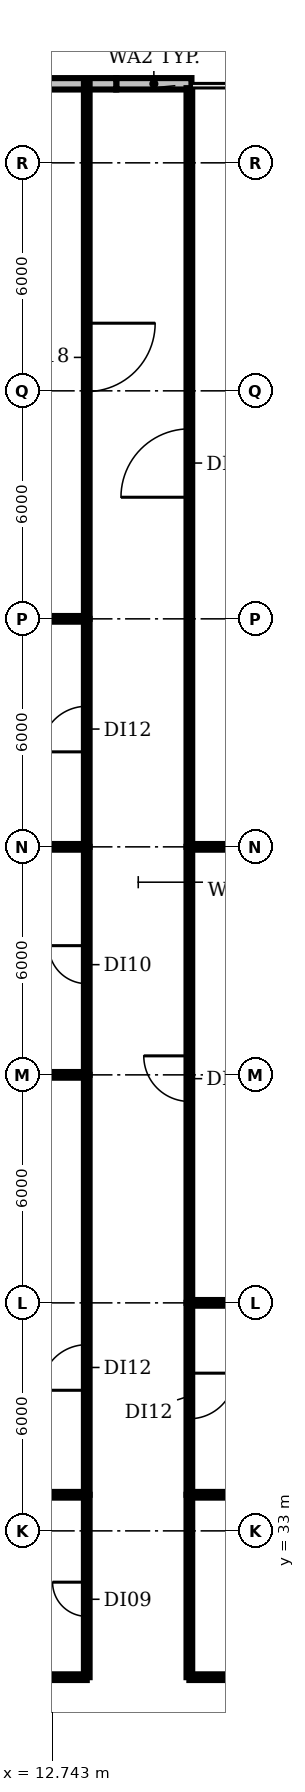
"""IFC4 building model, lengths in metres.
Left out: names, types, materials, properties, quantities, classifications, styles, units other than length and angle.
Written with IfcOpenShell. Run it as: python <this file> out.ifc"""

import sys

from ifc_helpers import new_model, si_unit, direction, frame, frame_2d, origin, place, context, subcontext, project, spatial, rectangle, extrude, element, fill, save


model = new_model("IFC4")
c1 = context("Model", 3, precision=1e-05, world=origin(), true_north=direction((0.0, 1.0)))
c2 = subcontext(c1, "Body", "Model", "MODEL_VIEW")
j1 = project(units=[si_unit("LENGTHUNIT", "METRE"), si_unit("PLANEANGLEUNIT", "RADIAN")], contexts=[c1])
p1 = place(None, origin())
s1 = spatial("IfcSite", under=j1, at=p1, CompositionType="ELEMENT")
p2 = place(p1, origin())
s2 = spatial("IfcBuilding", under=s1, at=p2, CompositionType="ELEMENT")
p3 = place(p2, frame((0.0, 0.0, 234.8)))
s3 = spatial("IfcBuildingStorey", under=s2, at=p3, CompositionType="ELEMENT", Elevation=234.8)
p4 = place(p3, frame((16.405, 71.08, 0.0), z_axis=(0.0, 0.0, 1.0), x_axis=(-1.0, 0.0, 0.0)))
e1 = element("IfcWall", 1, at=p4, inside=s3, PredefinedType="SOLIDWALL", context=c2, shape_type="SweptSolid", body=[
    extrude(rectangle(XDim=1.979, YDim=0.3, at=frame_2d((0.989, 0.0))), origin(), (0.0, 0.0, 1.0), 3.85),
])
p5 = place(p3, frame((14.427, 71.08, 0.0), z_axis=(0.0, 0.0, 1.0), x_axis=(-0.999999792909, -0.000643569533, 0.0)))
e2 = element("IfcWall", 2, at=p5, inside=s3, PredefinedType="SOLIDWALL", context=c2, shape_type="SweptSolid", body=[
    extrude(rectangle(XDim=6.828, YDim=0.3, at=frame_2d((3.414, 0.0))), origin(), (0.0, 0.0, 1.0), 3.85),
])
p6 = place(p3, frame((-1.05, 33.95, 0.0), z_axis=(0.0, 0.0, 1.0), x_axis=(1.0, 0.0, 0.0)))
e3 = element("IfcWall", 3, at=p6, inside=s3, PredefinedType="PARTITIONING", context=c2, shape_type="SweptSolid", body=[
    extrude(rectangle(XDim=14.7, YDim=0.15, at=frame_2d((7.35, 0.0))), origin(), (0.0, 0.0, 1.0), 2.88),
])
for number, where, z_axis, x_axis in (
    (4, (-0.98, 45.0, 0.0), (0.0, 0.0, 1.0), (1.0, 0.0, 0.0)),
    (5, (-0.98, 51.0, 0.0), (0.0, 0.0, 1.0), (1.0, 0.0, 0.0)),
    (6, (-0.98, 57.0, 0.0), (0.0, 0.0, 1.0), (1.0, 0.0, 0.0)),
):
    element("IfcWall", number, at=place(p3, frame(where, z_axis=z_axis, x_axis=x_axis)), inside=s3, PredefinedType="PARTITIONING", context=c2, shape_type="SweptSolid", body=[
        extrude(rectangle(XDim=14.63, YDim=0.15, at=frame_2d((7.315, 0.0))), origin(), (0.0, 0.0, 1.0), 2.88),
    ])
p7 = place(p3, frame((6.4, 29.15, 0.0), z_axis=(0.0, 0.0, 1.0), x_axis=(1.0, 0.0, 0.0)))
e7 = element("IfcWall", 7, at=p7, inside=s3, PredefinedType="PARTITIONING", context=c2, shape_type="SweptSolid", body=[
    extrude(rectangle(XDim=7.25, YDim=0.15, at=frame_2d((3.625, 0.0))), origin(), (0.0, 0.0, 1.0), 2.88),
])
p8 = place(p3, frame((13.65, 29.15, 0.0), z_axis=(0.0, 0.0, 1.0), x_axis=(0.0, 1.0, 0.0)))
e8 = element("IfcWall", 8, at=p8, inside=s3, PredefinedType="PARTITIONING", context=c2, shape_type="SweptSolid", body=[
    extrude(rectangle(XDim=4.8, YDim=0.15, at=frame_2d((2.4, 0.0))), origin(), (0.0, 0.0, 1.0), 2.88),
])
p9 = place(p8, frame((1.6, 0.0, 0.0)))
e9 = element("IfcOpeningElement", 9, at=p9, cuts=e8, PredefinedType="OPENING", context=c2, shape_type="SweptSolid", body=[
    extrude(rectangle(XDim=0.9, YDim=2.1, at=frame_2d((0.45, 1.05))), frame((0.0, 0.085, 0.0), z_axis=(0.0, -1.0, 0.0), x_axis=(1.0, 0.0, 0.0)), (0.0, 0.0, 1.0), 0.17),
])
p10 = place(p3, frame((13.65, 33.95, 0.0), z_axis=(0.0, 0.0, 1.0), x_axis=(0.0, 1.0, 0.0)))
e10 = element("IfcWall", 10, at=p10, inside=s3, PredefinedType="PARTITIONING", context=c2, shape_type="SweptSolid", body=[
    extrude(rectangle(XDim=11.05, YDim=0.15, at=frame_2d((5.525, 0.0))), origin(), (0.0, 0.0, 1.0), 2.88),
])
p11 = place(p10, frame((2.75, 0.0, 0.0)))
e11 = element("IfcOpeningElement", 11, at=p11, cuts=e10, PredefinedType="OPENING", context=c2, shape_type="SweptSolid", body=[
    extrude(rectangle(XDim=1.2, YDim=2.1, at=frame_2d((0.6, 1.05))), frame((0.0, 0.085, 0.0), z_axis=(0.0, -1.0, 0.0), x_axis=(1.0, 0.0, 0.0)), (0.0, 0.0, 1.0), 0.17),
])
p12 = place(p3, frame((13.65, 45.0, 0.0), z_axis=(0.0, 0.0, 1.0), x_axis=(0.0, 1.0, 0.0)))
e12 = element("IfcWall", 12, at=p12, inside=s3, PredefinedType="PARTITIONING", context=c2, shape_type="SweptSolid", body=[
    extrude(rectangle(XDim=6.0, YDim=0.15, at=frame_2d((3.0, 0.0))), origin(), (0.0, 0.0, 1.0), 2.88),
])
p13 = place(p12, frame((2.4, 0.0, 0.0)))
e13 = element("IfcOpeningElement", 13, at=p13, cuts=e12, PredefinedType="OPENING", context=c2, shape_type="SweptSolid", body=[
    extrude(rectangle(XDim=1.0, YDim=2.1, at=frame_2d((0.5, 1.05))), frame((0.0, 0.085, 0.0), z_axis=(0.0, -1.0, 0.0), x_axis=(1.0, 0.0, 0.0)), (0.0, 0.0, 1.0), 0.17),
])
p14 = place(p3, frame((13.65, 51.0, 0.0), z_axis=(0.0, 0.0, 1.0), x_axis=(0.0, 1.0, 0.0)))
e14 = element("IfcWall", 14, at=p14, inside=s3, PredefinedType="PARTITIONING", context=c2, shape_type="SweptSolid", body=[
    extrude(rectangle(XDim=6.0, YDim=0.15, at=frame_2d((3.0, 0.0))), origin(), (0.0, 0.0, 1.0), 2.88),
])
p15 = place(p14, frame((2.5, 0.0, 0.0)))
e15 = element("IfcOpeningElement", 15, at=p15, cuts=e14, PredefinedType="OPENING", context=c2, shape_type="SweptSolid", body=[
    extrude(rectangle(XDim=1.2, YDim=2.1, at=frame_2d((0.6, 1.05))), frame((0.0, 0.085, 0.0), z_axis=(0.0, -1.0, 0.0), x_axis=(1.0, 0.0, 0.0)), (0.0, 0.0, 1.0), 0.17),
])
p16 = place(p3, frame((13.65, 71.09, 0.0), z_axis=(0.0, 0.0, 1.0), x_axis=(0.0, -1.0, 0.0)))
e16 = element("IfcWall", 16, at=p16, inside=s3, PredefinedType="PARTITIONING", context=c2, shape_type="SweptSolid", body=[
    extrude(rectangle(XDim=14.09, YDim=0.15, at=frame_2d((7.045, 0.0))), origin(), (0.0, 0.0, 1.0), 2.88),
])
p17 = place(p16, frame((6.31, 0.0, 0.0)))
e17 = element("IfcOpeningElement", 17, at=p17, cuts=e16, PredefinedType="OPENING", context=c2, shape_type="SweptSolid", body=[
    extrude(rectangle(XDim=1.8, YDim=2.1, at=frame_2d((0.9, 1.05))), frame((0.0, 0.085, 0.0), z_axis=(0.0, -1.0, 0.0), x_axis=(1.0, 0.0, 0.0)), (0.0, 0.0, 1.0), 0.17),
])
p18 = place(p3, frame((16.35, 29.15, 0.0), z_axis=(0.0, 0.0, 1.0), x_axis=(0.0, 1.0, 0.0)))
e18 = element("IfcWall", 18, at=p18, inside=s3, PredefinedType="PARTITIONING", context=c2, shape_type="SweptSolid", body=[
    extrude(rectangle(XDim=4.8, YDim=0.15, at=frame_2d((2.4, 0.0))), origin(), (0.0, 0.0, 1.0), 2.88),
])
p19 = place(p3, frame((16.35, 29.15, 0.0), z_axis=(0.0, 0.0, 1.0), x_axis=(1.0, 0.0, 0.0)))
e19 = element("IfcWall", 19, at=p19, inside=s3, PredefinedType="PARTITIONING", context=c2, shape_type="SweptSolid", body=[
    extrude(rectangle(XDim=1.25, YDim=0.15, at=frame_2d((0.625, 0.0))), origin(), (0.0, 0.0, 1.0), 2.88),
])
p20 = place(p3, frame((16.35, 33.95, 0.0), z_axis=(0.0, 0.0, 1.0), x_axis=(1.0, 0.0, 0.0)))
e20 = element("IfcWall", 20, at=p20, inside=s3, PredefinedType="PARTITIONING", context=c2, shape_type="SweptSolid", body=[
    extrude(rectangle(XDim=8.63, YDim=0.15, at=frame_2d((4.315, 0.0))), origin(), (0.0, 0.0, 1.0), 2.88),
])
p21 = place(p3, frame((16.35, 39.0, 0.0), z_axis=(0.0, 0.0, 1.0), x_axis=(0.0, -1.0, 0.0)))
e21 = element("IfcWall", 21, at=p21, inside=s3, PredefinedType="PARTITIONING", context=c2, shape_type="SweptSolid", body=[
    extrude(rectangle(XDim=5.05, YDim=0.15, at=frame_2d((2.525, 0.0))), origin(), (0.0, 0.0, 1.0), 2.88),
])
p22 = place(p21, frame((1.85, 0.0, 0.0)))
e22 = element("IfcOpeningElement", 22, at=p22, cuts=e21, PredefinedType="OPENING", context=c2, shape_type="SweptSolid", body=[
    extrude(rectangle(XDim=1.2, YDim=2.1, at=frame_2d((0.6, 1.05))), frame((0.0, 0.085, 0.0), z_axis=(0.0, -1.0, 0.0), x_axis=(1.0, 0.0, 0.0)), (0.0, 0.0, 1.0), 0.17),
])
p23 = place(p3, frame((16.35, 39.0, 0.0), z_axis=(0.0, 0.0, 1.0), x_axis=(0.0, 1.0, 0.0)))
e23 = element("IfcWall", 23, at=p23, inside=s3, PredefinedType="PARTITIONING", context=c2, shape_type="SweptSolid", body=[
    extrude(rectangle(XDim=12.0, YDim=0.15, at=frame_2d((6.0, 0.0))), origin(), (0.0, 0.0, 1.0), 2.88),
])
p24 = place(p23, frame((5.3, 0.0, 0.0)))
e24 = element("IfcOpeningElement", 24, at=p24, cuts=e23, PredefinedType="OPENING", context=c2, shape_type="SweptSolid", body=[
    extrude(rectangle(XDim=1.2, YDim=2.1, at=frame_2d((0.6, 1.05))), frame((0.0, 0.085, 0.0), z_axis=(0.0, -1.0, 0.0), x_axis=(1.0, 0.0, 0.0)), (0.0, 0.0, 1.0), 0.17),
])
p25 = place(p3, frame((16.35, 39.0, 0.0), z_axis=(0.0, 0.0, 1.0), x_axis=(1.0, 0.0, 0.0)))
e25 = element("IfcWall", 25, at=p25, inside=s3, PredefinedType="PARTITIONING", context=c2, shape_type="SweptSolid", body=[
    extrude(rectangle(XDim=8.7, YDim=0.15, at=frame_2d((4.35, 0.0))), origin(), (0.0, 0.0, 1.0), 2.88),
])
p26 = place(p3, frame((16.35, 51.0, 0.0), z_axis=(0.0, 0.0, 1.0), x_axis=(0.0, 1.0, 0.0)))
e26 = element("IfcWall", 26, at=p26, inside=s3, PredefinedType="PARTITIONING", context=c2, shape_type="SweptSolid", body=[
    extrude(rectangle(XDim=19.965, YDim=0.15, at=frame_2d((9.982, 0.0))), origin(), (0.0, 0.0, 1.0), 2.88),
])
p27 = place(p26, frame((9.2, 0.0, 0.0)))
e27 = element("IfcOpeningElement", 27, at=p27, cuts=e26, PredefinedType="OPENING", context=c2, shape_type="SweptSolid", body=[
    extrude(rectangle(XDim=1.8, YDim=2.1, at=frame_2d((0.9, 1.05))), frame((0.0, 0.085, 0.0), z_axis=(0.0, -1.0, 0.0), x_axis=(1.0, 0.0, 0.0)), (0.0, 0.0, 1.0), 0.17),
])
p28 = place(p3, frame((16.35, 51.0, 0.0), z_axis=(0.0, 0.0, 1.0), x_axis=(1.0, 0.0, 0.0)))
e28 = element("IfcWall", 28, at=p28, inside=s3, PredefinedType="PARTITIONING", context=c2, shape_type="SweptSolid", body=[
    extrude(rectangle(XDim=9.02, YDim=0.15, at=frame_2d((4.51, 0.0))), origin(), (0.0, 0.0, 1.0), 2.88),
])
p29 = place(p9, origin())
e29 = element("IfcDoor", 29, at=p29, inside=s3, OperationType="SINGLE_SWING_RIGHT", PredefinedType="DOOR", context=c2, shape_type="SweptSolid", body=[
    extrude(rectangle(XDim=0.9, YDim=2.1, at=frame_2d((0.45, 1.05))), frame((0.0, 0.025, 0.0), z_axis=(0.0, -1.0, 0.0), x_axis=(1.0, 0.0, 0.0)), (0.0, 0.0, 1.0), 0.05),
])
fill(e9, e29)
p30 = place(p11, origin())
e30 = element("IfcDoor", 30, at=p30, inside=s3, OperationType="SINGLE_SWING_LEFT", PredefinedType="DOOR", context=c2, shape_type="SweptSolid", body=[
    extrude(rectangle(XDim=1.2, YDim=2.1, at=frame_2d((0.6, 1.05))), frame((0.0, 0.025, 0.0), z_axis=(0.0, -1.0, 0.0), x_axis=(1.0, 0.0, 0.0)), (0.0, 0.0, 1.0), 0.05),
])
fill(e11, e30)
p31 = place(p13, origin())
e31 = element("IfcDoor", 31, at=p31, inside=s3, OperationType="SINGLE_SWING_RIGHT", PredefinedType="DOOR", context=c2, shape_type="SweptSolid", body=[
    extrude(rectangle(XDim=1.0, YDim=2.1, at=frame_2d((0.5, 1.05))), frame((0.0, 0.025, 0.0), z_axis=(0.0, -1.0, 0.0), x_axis=(1.0, 0.0, 0.0)), (0.0, 0.0, 1.0), 0.05),
])
fill(e13, e31)
p32 = place(p15, origin())
e32 = element("IfcDoor", 32, at=p32, inside=s3, OperationType="SINGLE_SWING_LEFT", PredefinedType="DOOR", context=c2, shape_type="SweptSolid", body=[
    extrude(rectangle(XDim=1.2, YDim=2.1, at=frame_2d((0.6, 1.05))), frame((0.0, 0.025, 0.0), z_axis=(0.0, -1.0, 0.0), x_axis=(1.0, 0.0, 0.0)), (0.0, 0.0, 1.0), 0.05),
])
fill(e15, e32)
p33 = place(p17, origin())
e33 = element("IfcDoor", 33, at=p33, inside=s3, OperationType="SINGLE_SWING_LEFT", PredefinedType="DOOR", context=c2, shape_type="SweptSolid", body=[
    extrude(rectangle(XDim=1.8, YDim=2.1, at=frame_2d((0.9, 1.05))), frame((0.0, 0.025, 0.0), z_axis=(0.0, -1.0, 0.0), x_axis=(1.0, 0.0, 0.0)), (0.0, 0.0, 1.0), 0.05),
])
fill(e17, e33)
p34 = place(p22, origin())
e34 = element("IfcDoor", 34, at=p34, inside=s3, OperationType="SINGLE_SWING_LEFT", PredefinedType="DOOR", context=c2, shape_type="SweptSolid", body=[
    extrude(rectangle(XDim=1.2, YDim=2.1, at=frame_2d((0.6, 1.05))), frame((0.0, 0.025, 0.0), z_axis=(0.0, -1.0, 0.0), x_axis=(1.0, 0.0, 0.0)), (0.0, 0.0, 1.0), 0.05),
])
fill(e22, e34)
p35 = place(p24, origin())
e35 = element("IfcDoor", 35, at=p35, inside=s3, OperationType="SINGLE_SWING_RIGHT", PredefinedType="DOOR", context=c2, shape_type="SweptSolid", body=[
    extrude(rectangle(XDim=1.2, YDim=2.1, at=frame_2d((0.6, 1.05))), frame((0.0, 0.025, 0.0), z_axis=(0.0, -1.0, 0.0), x_axis=(1.0, 0.0, 0.0)), (0.0, 0.0, 1.0), 0.05),
])
fill(e24, e35)
p36 = place(p27, origin())
e36 = element("IfcDoor", 36, at=p36, inside=s3, OperationType="SINGLE_SWING_LEFT", PredefinedType="DOOR", context=c2, shape_type="SweptSolid", body=[
    extrude(rectangle(XDim=1.8, YDim=2.1, at=frame_2d((0.9, 1.05))), frame((0.0, 0.025, 0.0), z_axis=(0.0, -1.0, 0.0), x_axis=(1.0, 0.0, 0.0)), (0.0, 0.0, 1.0), 0.05),
])
fill(e27, e36)
save(model, sys.argv[1])
